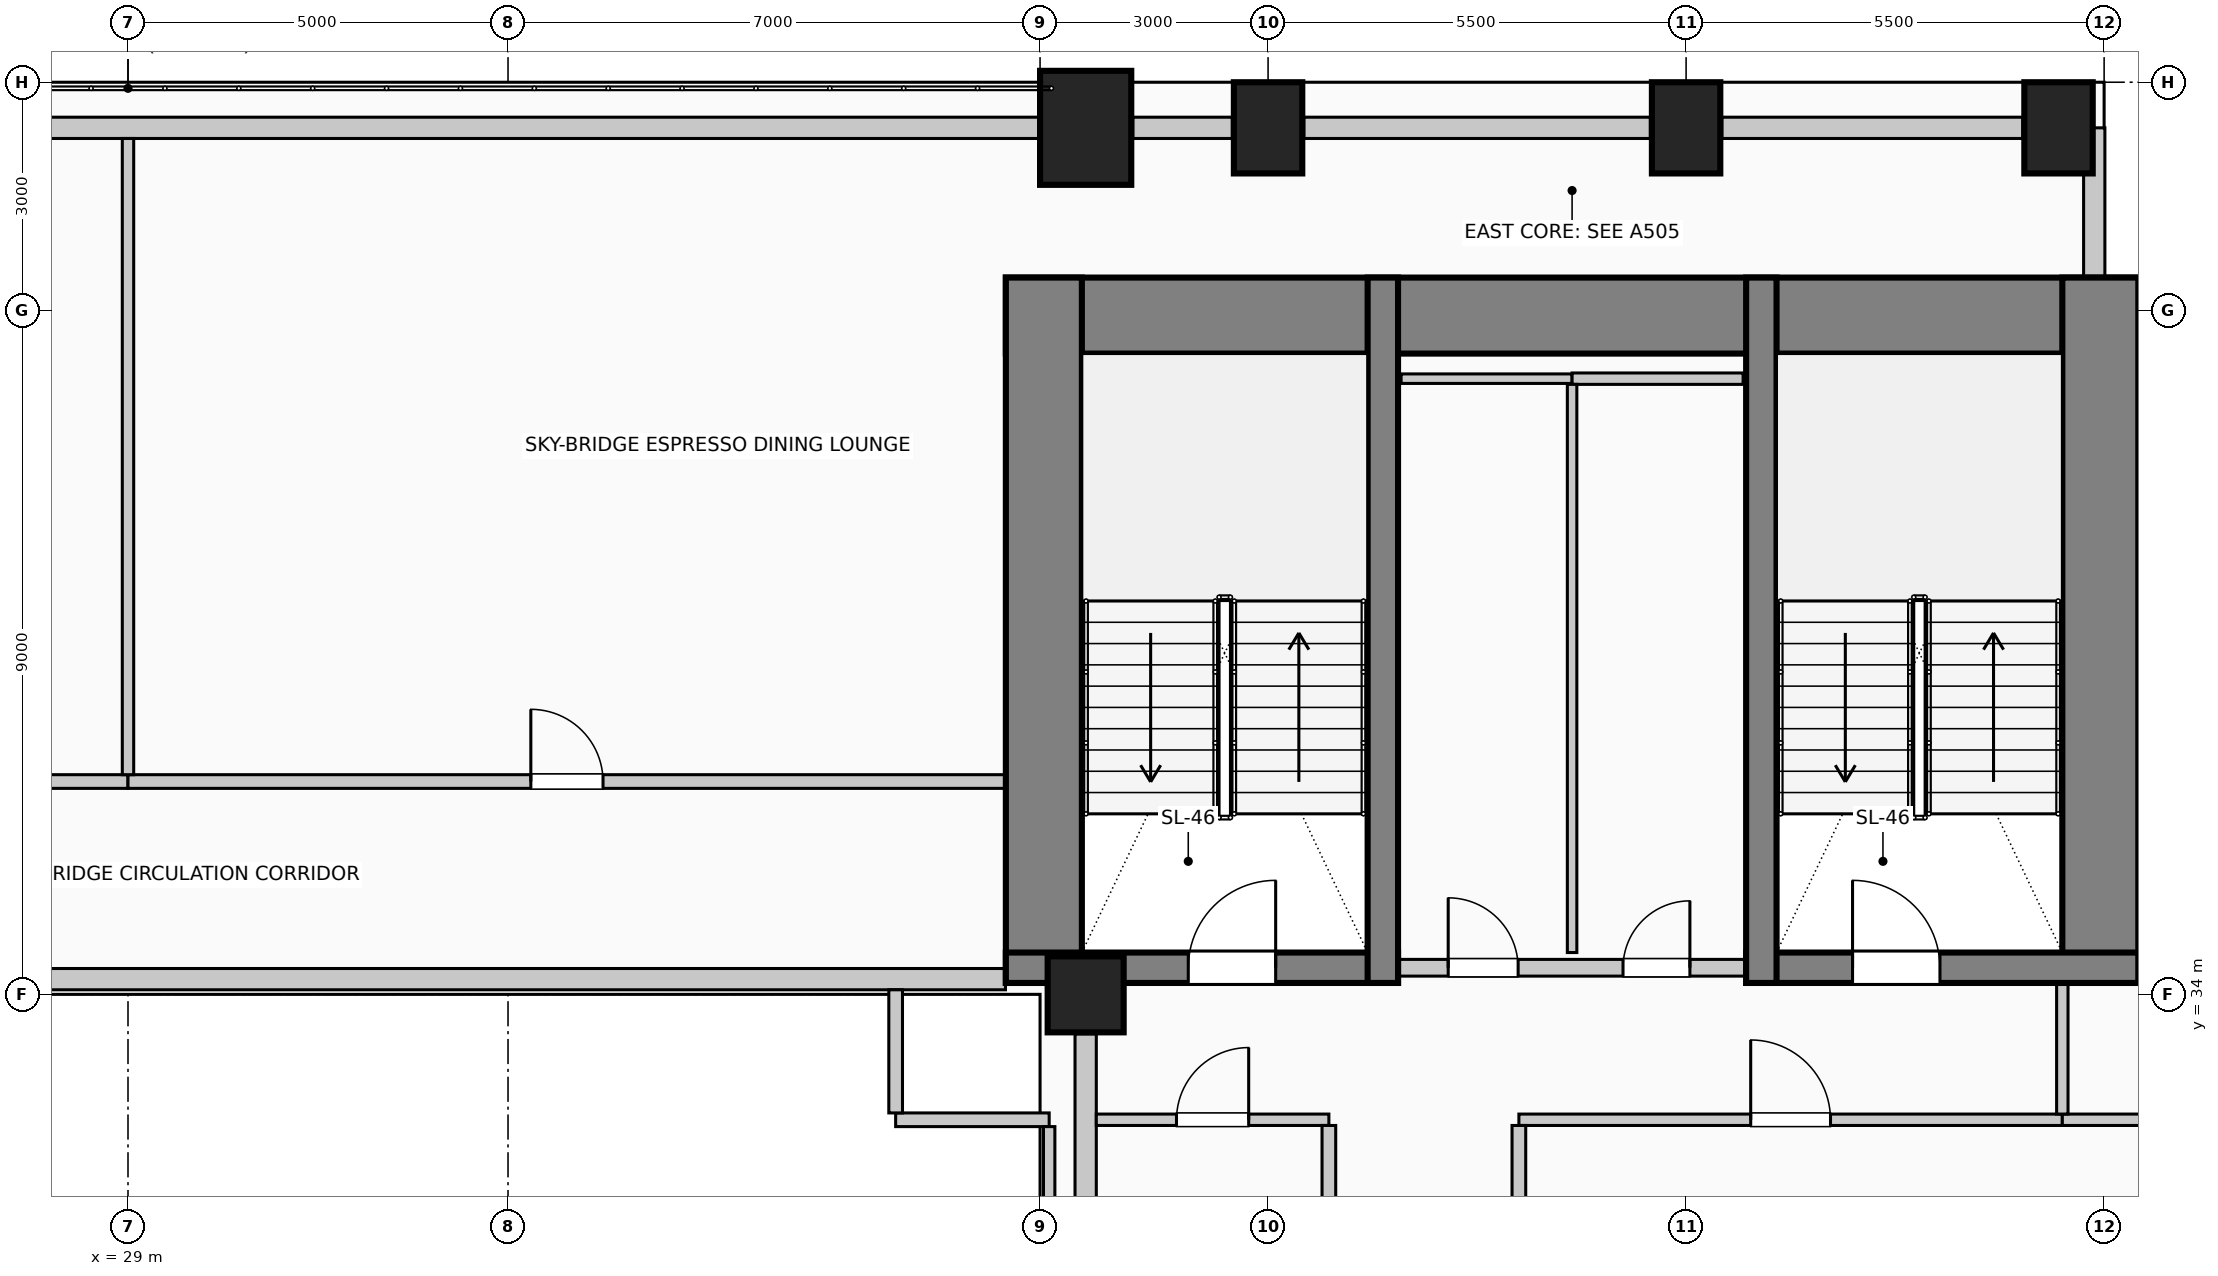
"""IFC4 building model, lengths in metres.
Left out: names, types, materials, properties, quantities, classifications, styles, units other than length and angle.
Written with IfcOpenShell. Run it as: python <this file> out.ifc"""

import sys

from ifc_helpers import new_model, si_unit, direction, frame, frame_2d, origin, origin_2d, place, context, subcontext, project, spatial, rectangle, circle, extrude, element, fill, save


model = new_model("IFC4")
c1 = context("Model", 3, precision=1e-05, world=origin(), true_north=direction((0.0, 1.0)))
c2 = subcontext(c1, "Body", "Model", "MODEL_VIEW")
j1 = project(units=[si_unit("LENGTHUNIT", "METRE"), si_unit("PLANEANGLEUNIT", "RADIAN")], contexts=[c1])
p1 = place(None, origin())
s1 = spatial("IfcSite", under=j1, at=p1, CompositionType="ELEMENT")
p2 = place(p1, origin())
s2 = spatial("IfcBuilding", under=s1, at=p2, CompositionType="ELEMENT")
p3 = place(p2, frame((0.0, 0.0, 42.6)))
s3 = spatial("IfcBuildingStorey", under=s2, at=p3, CompositionType="ELEMENT", Elevation=42.6)
p4 = place(p3, frame((40.55, 42.93, 0.0), z_axis=(0.0, 0.0, 1.0), x_axis=(1.0, 0.0, 0.0)))
e1 = element("IfcWall", 1, at=p4, inside=s3, PredefinedType="SHEAR", context=c2, shape_type="SweptSolid", body=[
    extrude(rectangle(XDim=14.9, YDim=1.0, at=frame_2d((7.45, 0.0))), origin(), (0.0, 0.0, 1.0), 4.0),
])
for number, where, z_axis, x_axis in (
    (2, (41.05, 34.15, 0.0), (0.0, 0.0, 1.0), (0.0, 1.0, 0.0)),
    (3, (54.95, 34.15, 0.0), (0.0, 0.0, 1.0), (0.0, 1.0, 0.0)),
):
    element("IfcWall", number, at=place(p3, frame(where, z_axis=z_axis, x_axis=x_axis)), inside=s3, PredefinedType="SHEAR", context=c2, shape_type="SweptSolid", body=[
        extrude(rectangle(XDim=9.28, YDim=1.0, at=frame_2d((4.64, 0.0))), origin(), (0.0, 0.0, 1.0), 4.0),
    ])
p5 = place(p3, frame((40.55, 34.35, 0.0), z_axis=(0.0, 0.0, 1.0), x_axis=(1.0, 0.0, 0.0)))
e4 = element("IfcWall", 4, at=p5, inside=s3, PredefinedType="SHEAR", context=c2, shape_type="SweptSolid", body=[
    extrude(rectangle(XDim=5.16, YDim=0.4, at=frame_2d((2.58, 0.0))), origin(), (0.0, 0.0, 1.0), 4.0),
])
p6 = place(p5, frame((2.4, 0.0, 0.0)))
e5 = element("IfcOpeningElement", 5, at=p6, cuts=e4, PredefinedType="OPENING", context=c2, shape_type="SweptSolid", body=[
    extrude(rectangle(XDim=1.15, YDim=2.2, at=frame_2d((0.575, 1.1))), frame((0.0, 0.21, 0.0), z_axis=(0.0, -1.0, 0.0), x_axis=(1.0, 0.0, 0.0)), (0.0, 0.0, 1.0), 0.42),
])
p7 = place(p3, frame((45.51, 34.15, 0.0), z_axis=(0.0, 0.0, 1.0), x_axis=(0.0, 1.0, 0.0)))
e6 = element("IfcWall", 6, at=p7, inside=s3, PredefinedType="SHEAR", context=c2, shape_type="SweptSolid", body=[
    extrude(rectangle(XDim=9.28, YDim=0.4, at=frame_2d((4.64, 0.0))), origin(), (0.0, 0.0, 1.0), 4.0),
])
p8 = place(p3, frame((50.29, 34.35, 0.0), z_axis=(0.0, 0.0, 1.0), x_axis=(1.0, 0.0, 0.0)))
e7 = element("IfcWall", 7, at=p8, inside=s3, PredefinedType="SHEAR", context=c2, shape_type="SweptSolid", body=[
    extrude(rectangle(XDim=5.16, YDim=0.4, at=frame_2d((2.58, 0.0))), origin(), (0.0, 0.0, 1.0), 4.0),
])
p9 = place(p8, frame((1.4, 0.0, 0.0)))
e8 = element("IfcOpeningElement", 8, at=p9, cuts=e7, PredefinedType="OPENING", context=c2, shape_type="SweptSolid", body=[
    extrude(rectangle(XDim=1.15, YDim=2.2, at=frame_2d((0.575, 1.1))), frame((0.0, 0.21, 0.0), z_axis=(0.0, -1.0, 0.0), x_axis=(1.0, 0.0, 0.0)), (0.0, 0.0, 1.0), 0.42),
])
p10 = place(p3, frame((50.49, 34.15, 0.0), z_axis=(0.0, 0.0, 1.0), x_axis=(0.0, 1.0, 0.0)))
e9 = element("IfcWall", 9, at=p10, inside=s3, PredefinedType="SHEAR", context=c2, shape_type="SweptSolid", body=[
    extrude(rectangle(XDim=9.28, YDim=0.4, at=frame_2d((4.64, 0.0))), origin(), (0.0, 0.0, 1.0), 4.0),
])
p11 = place(p3, frame((41.6, 45.4, 0.0), z_axis=(0.0, 0.0, 1.0), x_axis=(1.0, 0.0, 0.0)))
e10 = element("IfcColumn", 10, at=p11, inside=s3, PredefinedType="COLUMN", context=c2, shape_type="SweptSolid", body=[
    extrude(rectangle(XDim=1.2, YDim=1.5, at=origin_2d()), origin(), (0.0, 0.0, 1.0), 4.0),
])
for number, where, z_axis, x_axis in (
    (11, (44.0, 45.4, 0.0), (0.0, 0.0, 1.0), (1.0, 0.0, 0.0)),
    (12, (49.5, 45.4, 0.0), (0.0, 0.0, 1.0), (1.0, 0.0, 0.0)),
    (13, (54.4, 45.4, 0.0), (0.0, 0.0, 1.0), (1.0, 0.0, 0.0)),
):
    element("IfcColumn", number, at=place(p3, frame(where, z_axis=z_axis, x_axis=x_axis)), inside=s3, PredefinedType="COLUMN", context=c2, shape_type="SweptSolid", body=[
        extrude(rectangle(XDim=0.9, YDim=1.2, at=origin_2d()), origin(), (0.0, 0.0, 1.0), 4.0),
    ])
p12 = place(p3, frame((41.6, 34.0, 0.0), z_axis=(0.0, 0.0, 1.0), x_axis=(1.0, 0.0, 0.0)))
e14 = element("IfcColumn", 14, at=p12, inside=s3, PredefinedType="COLUMN", context=c2, shape_type="SweptSolid", body=[
    extrude(circle(Radius=0.5, at=origin_2d()), origin(), (0.0, 0.0, 1.0), 4.0),
])
p13 = place(p3, frame((17.02, 45.4, 0.0), z_axis=(0.0, 0.0, 1.0), x_axis=(1.0, 0.0, 0.0)))
e15 = element("IfcWall", 15, at=p13, inside=s3, PredefinedType="SOLIDWALL", context=c2, shape_type="SweptSolid", body=[
    extrude(rectangle(XDim=23.96, YDim=0.28, at=frame_2d((11.98, 0.0))), origin(), (0.0, 0.0, 1.0), 0.7),
])
p14 = place(p3, frame((42.22, 45.4, 0.0), z_axis=(0.0, 0.0, 1.0), x_axis=(1.0, 0.0, 0.0)))
e16 = element("IfcWall", 16, at=p14, inside=s3, PredefinedType="SOLIDWALL", context=c2, shape_type="SweptSolid", body=[
    extrude(rectangle(XDim=1.31, YDim=0.28, at=frame_2d((0.655, 0.0))), origin(), (0.0, 0.0, 1.0), 2.85),
])
p15 = place(p3, frame((44.47, 45.4, 0.0), z_axis=(0.0, 0.0, 1.0), x_axis=(1.0, 0.0, 0.0)))
e17 = element("IfcWall", 17, at=p15, inside=s3, PredefinedType="SOLIDWALL", context=c2, shape_type="SweptSolid", body=[
    extrude(rectangle(XDim=4.56, YDim=0.28, at=frame_2d((2.28, 0.0))), origin(), (0.0, 0.0, 1.0), 2.85),
])
p16 = place(p3, frame((49.97, 45.4, 0.0), z_axis=(0.0, 0.0, 1.0), x_axis=(1.0, 0.0, 0.0)))
e18 = element("IfcWall", 18, at=p16, inside=s3, PredefinedType="SOLIDWALL", context=c2, shape_type="SweptSolid", body=[
    extrude(rectangle(XDim=3.96, YDim=0.28, at=frame_2d((1.98, 0.0))), origin(), (0.0, 0.0, 1.0), 2.85),
])
p17 = place(p3, frame((54.87, 45.4, 0.0), z_axis=(0.0, 0.0, 1.0), x_axis=(0.0, -1.0, 0.0)))
e19 = element("IfcWall", 19, at=p17, inside=s3, PredefinedType="SOLIDWALL", context=c2, shape_type="SweptSolid", body=[
    extrude(rectangle(XDim=1.965, YDim=0.28, at=frame_2d((0.982, 0.0))), origin(), (0.0, 0.0, 1.0), 3.7),
])
p18 = place(p3, frame((41.6, 26.77, 0.0), z_axis=(0.0, 0.0, 1.0), x_axis=(0.0, 1.0, 0.0)))
e20 = element("IfcWall", 20, at=p18, inside=s3, PredefinedType="SOLIDWALL", context=c2, shape_type="SweptSolid", body=[
    extrude(rectangle(XDim=6.71, YDim=0.28, at=frame_2d((3.355, 0.0))), origin(), (0.0, 0.0, 1.0), 3.0),
])
p19 = place(p3, frame((40.545, 34.2, 0.0), z_axis=(0.0, 0.0, 1.0), x_axis=(-1.0, 0.0, 0.0)))
e21 = element("IfcWall", 21, at=p19, inside=s3, PredefinedType="SOLIDWALL", context=c2, shape_type="SweptSolid", body=[
    extrude(rectangle(XDim=23.09, YDim=0.28, at=frame_2d((11.545, 0.0))), origin(), (0.0, 0.0, 1.0), 0.7),
])
p20 = place(p3, frame((45.72, 34.35, 0.0), z_axis=(0.0, 0.0, 1.0), x_axis=(1.0, 0.0, 0.0)))
e22 = element("IfcWall", 22, at=p20, inside=s3, PredefinedType="PARTITIONING", context=c2, shape_type="SweptSolid", body=[
    extrude(rectangle(XDim=4.56, YDim=0.22, at=frame_2d((2.28, 0.0))), origin(), (0.0, 0.0, 1.0), 3.7),
])
p21 = place(p20, frame((0.65, 0.0, 0.0)))
e23 = element("IfcOpeningElement", 23, at=p21, cuts=e22, PredefinedType="OPENING", context=c2, shape_type="SweptSolid", body=[
    extrude(rectangle(XDim=0.92, YDim=2.1, at=frame_2d((0.46, 1.05))), frame((0.0, 0.12, 0.0), z_axis=(0.0, -1.0, 0.0), x_axis=(1.0, 0.0, 0.0)), (0.0, 0.0, 1.0), 0.24),
])
p22 = place(p20, frame((2.95, 0.0, 0.0)))
e24 = element("IfcOpeningElement", 24, at=p22, cuts=e22, PredefinedType="OPENING", context=c2, shape_type="SweptSolid", body=[
    extrude(rectangle(XDim=0.88, YDim=2.1, at=frame_2d((0.44, 1.05))), frame((0.0, 0.12, 0.0), z_axis=(0.0, -1.0, 0.0), x_axis=(1.0, 0.0, 0.0)), (0.0, 0.0, 1.0), 0.24),
])
p23 = place(p3, frame((39.1, 32.35, 0.0), z_axis=(0.0, 0.0, 1.0), x_axis=(1.0, 0.0, 0.0)))
e25 = element("IfcWall", 25, at=p23, inside=s3, PredefinedType="PARTITIONING", context=c2, shape_type="SweptSolid", body=[
    extrude(rectangle(XDim=2.02, YDim=0.18, at=frame_2d((1.01, 0.0))), origin(), (0.0, 0.0, 1.0), 3.7),
])
p24 = place(p3, frame((41.74, 32.35, 0.0), z_axis=(0.0, 0.0, 1.0), x_axis=(1.0, 0.0, 0.0)))
e26 = element("IfcWall", 26, at=p24, inside=s3, PredefinedType="PARTITIONING", context=c2, shape_type="SweptSolid", body=[
    extrude(rectangle(XDim=3.06, YDim=0.15, at=frame_2d((1.53, 0.0))), origin(), (0.0, 0.0, 1.0), 3.7),
])
p25 = place(p24, frame((1.055, 0.0, 0.0)))
e27 = element("IfcOpeningElement", 27, at=p25, cuts=e26, PredefinedType="OPENING", context=c2, shape_type="SweptSolid", body=[
    extrude(rectangle(XDim=0.95, YDim=2.15, at=frame_2d((0.475, 1.075))), frame((0.0, 0.085, 0.0), z_axis=(0.0, -1.0, 0.0), x_axis=(1.0, 0.0, 0.0)), (0.0, 0.0, 1.0), 0.17),
])
p26 = place(p3, frame((47.3, 32.35, 0.0), z_axis=(0.0, 0.0, 1.0), x_axis=(1.0, 0.0, 0.0)))
e28 = element("IfcWall", 28, at=p26, inside=s3, PredefinedType="PARTITIONING", context=c2, shape_type="SweptSolid", body=[
    extrude(rectangle(XDim=7.15, YDim=0.15, at=frame_2d((3.575, 0.0))), origin(), (0.0, 0.0, 1.0), 3.7),
])
p27 = place(p26, frame((3.05, 0.0, 0.0)))
e29 = element("IfcOpeningElement", 29, at=p27, cuts=e28, PredefinedType="OPENING", context=c2, shape_type="SweptSolid", body=[
    extrude(rectangle(XDim=1.05, YDim=2.15, at=frame_2d((0.525, 1.075))), frame((0.0, 0.085, 0.0), z_axis=(0.0, -1.0, 0.0), x_axis=(1.0, 0.0, 0.0)), (0.0, 0.0, 1.0), 0.17),
])
p28 = place(p3, frame((54.45, 32.35, 0.0), z_axis=(0.0, 0.0, 1.0), x_axis=(1.0, 0.0, 0.0)))
e30 = element("IfcWall", 30, at=p28, inside=s3, PredefinedType="PARTITIONING", context=c2, shape_type="SweptSolid", body=[
    extrude(rectangle(XDim=2.81, YDim=0.15, at=frame_2d((1.405, 0.0))), origin(), (0.0, 0.0, 1.0), 3.7),
])
p29 = place(p3, frame((17.45, 36.8, 0.0), z_axis=(0.0, 0.0, 1.0), x_axis=(1.0, 0.0, 0.0)))
e31 = element("IfcWall", 31, at=p29, inside=s3, PredefinedType="PARTITIONING", context=c2, shape_type="SweptSolid", body=[
    extrude(rectangle(XDim=11.55, YDim=0.18, at=frame_2d((5.775, 0.0))), origin(), (0.0, 0.0, 1.0), 3.7),
])
p30 = place(p29, frame((5.075, 0.0, 0.0)))
e32 = element("IfcOpeningElement", 32, at=p30, cuts=e31, PredefinedType="OPENING", context=c2, shape_type="SweptSolid", body=[
    extrude(rectangle(XDim=1.4, YDim=2.2, at=frame_2d((0.7, 1.1))), frame((0.0, 0.1, 0.0), z_axis=(0.0, -1.0, 0.0), x_axis=(1.0, 0.0, 0.0)), (0.0, 0.0, 1.0), 0.2),
])
p31 = place(p3, frame((29.0, 36.8, 0.0), z_axis=(0.0, 0.0, 1.0), x_axis=(1.0, 0.0, 0.0)))
e33 = element("IfcWall", 33, at=p31, inside=s3, PredefinedType="PARTITIONING", context=c2, shape_type="SweptSolid", body=[
    extrude(rectangle(XDim=11.55, YDim=0.18, at=frame_2d((5.775, 0.0))), origin(), (0.0, 0.0, 1.0), 3.7),
])
p32 = place(p31, frame((5.3, 0.0, 0.0)))
e34 = element("IfcOpeningElement", 34, at=p32, cuts=e33, PredefinedType="OPENING", context=c2, shape_type="SweptSolid", body=[
    extrude(rectangle(XDim=0.95, YDim=2.15, at=frame_2d((0.475, 1.075))), frame((0.0, 0.1, 0.0), z_axis=(0.0, -1.0, 0.0), x_axis=(1.0, 0.0, 0.0)), (0.0, 0.0, 1.0), 0.2),
])
p33 = place(p3, frame((45.75, 42.1, 0.0), z_axis=(0.0, 0.0, 1.0), x_axis=(1.0, 0.0, 0.0)))
e35 = element("IfcWall", 35, at=p33, inside=s3, PredefinedType="PARTITIONING", context=c2, shape_type="SweptSolid", body=[
    extrude(rectangle(XDim=2.25, YDim=0.125, at=frame_2d((1.125, 0.0))), origin(), (0.0, 0.0, 1.0), 3.7),
])
p34 = place(p3, frame((48.0, 42.1, 0.0), z_axis=(0.0, 0.0, 1.0), x_axis=(1.0, 0.0, 0.0)))
e36 = element("IfcWall", 36, at=p34, inside=s3, PredefinedType="PARTITIONING", context=c2, shape_type="SweptSolid", body=[
    extrude(rectangle(XDim=2.25, YDim=0.15, at=frame_2d((1.125, 0.0))), origin(), (0.0, 0.0, 1.0), 3.7),
])
p35 = place(p3, frame((29.0, 36.89, 0.0), z_axis=(0.0, 0.0, 1.0), x_axis=(0.0, 1.0, 0.0)))
e37 = element("IfcWall", 37, at=p35, inside=s3, PredefinedType="PARTITIONING", context=c2, shape_type="SweptSolid", body=[
    extrude(rectangle(XDim=8.37, YDim=0.15, at=frame_2d((4.185, 0.0))), origin(), (0.0, 0.0, 1.0), 3.7),
])
p36 = place(p3, frame((39.1, 32.44, 0.0), z_axis=(0.0, 0.0, 1.0), x_axis=(0.0, 1.0, 0.0)))
e38 = element("IfcWall", 38, at=p36, inside=s3, PredefinedType="PARTITIONING", context=c2, shape_type="SweptSolid", body=[
    extrude(rectangle(XDim=1.62, YDim=0.18, at=frame_2d((0.81, 0.0))), origin(), (0.0, 0.0, 1.0), 3.7),
])
p37 = place(p3, frame((41.12, 26.75, 0.0), z_axis=(0.0, 0.0, 1.0), x_axis=(0.0, 1.0, 0.0)))
e39 = element("IfcWall", 39, at=p37, inside=s3, PredefinedType="PARTITIONING", context=c2, shape_type="SweptSolid", body=[
    extrude(rectangle(XDim=5.51, YDim=0.15, at=frame_2d((2.755, 0.0))), origin(), (0.0, 0.0, 1.0), 3.7),
])
p38 = place(p3, frame((44.8, 9.09, 0.0), z_axis=(0.0, 0.0, 1.0), x_axis=(0.0, 1.0, 0.0)))
e40 = element("IfcWall", 40, at=p38, inside=s3, PredefinedType="PARTITIONING", context=c2, shape_type="SweptSolid", body=[
    extrude(rectangle(XDim=23.185, YDim=0.18, at=frame_2d((11.592, 0.0))), origin(), (0.0, 0.0, 1.0), 3.7),
])
p39 = place(p3, frame((47.3, 18.075, 0.0), z_axis=(0.0, 0.0, 1.0), x_axis=(0.0, 1.0, 0.0)))
e41 = element("IfcWall", 41, at=p39, inside=s3, PredefinedType="PARTITIONING", context=c2, shape_type="SweptSolid", body=[
    extrude(rectangle(XDim=14.2, YDim=0.18, at=frame_2d((7.1, 0.0))), origin(), (0.0, 0.0, 1.0), 3.7),
])
p40 = place(p3, frame((48.0, 34.55, 0.0), z_axis=(0.0, 0.0, 1.0), x_axis=(0.0, 1.0, 0.0)))
e42 = element("IfcWall", 42, at=p40, inside=s3, PredefinedType="PARTITIONING", context=c2, shape_type="SweptSolid", body=[
    extrude(rectangle(XDim=7.475, YDim=0.125, at=frame_2d((3.737, 0.0))), origin(), (0.0, 0.0, 1.0), 3.7),
])
p41 = place(p3, frame((54.45, 32.425, 0.0), z_axis=(0.0, 0.0, 1.0), x_axis=(0.0, 1.0, 0.0)))
e43 = element("IfcWall", 43, at=p41, inside=s3, PredefinedType="PARTITIONING", context=c2, shape_type="SweptSolid", body=[
    extrude(rectangle(XDim=1.725, YDim=0.15, at=frame_2d((0.862, 0.0))), origin(), (0.0, 0.0, 1.0), 3.7),
])
p42 = place(p6, origin())
e44 = element("IfcDoor", 44, at=p42, inside=s3, OperationType="SINGLE_SWING_RIGHT", PredefinedType="DOOR", context=c2, shape_type="SweptSolid", body=[
    extrude(rectangle(XDim=1.15, YDim=2.2, at=frame_2d((0.575, 1.1))), frame((0.0, 0.025, 0.0), z_axis=(0.0, -1.0, 0.0), x_axis=(1.0, 0.0, 0.0)), (0.0, 0.0, 1.0), 0.05),
])
fill(e5, e44)
p43 = place(p21, origin())
e45 = element("IfcDoor", 45, at=p43, inside=s3, OperationType="SINGLE_SWING_LEFT", PredefinedType="DOOR", context=c2, shape_type="SweptSolid", body=[
    extrude(rectangle(XDim=0.92, YDim=2.1, at=frame_2d((0.46, 1.05))), frame((0.0, 0.025, 0.0), z_axis=(0.0, -1.0, 0.0), x_axis=(1.0, 0.0, 0.0)), (0.0, 0.0, 1.0), 0.05),
])
fill(e23, e45)
p44 = place(p22, origin())
e46 = element("IfcDoor", 46, at=p44, inside=s3, OperationType="SINGLE_SWING_RIGHT", PredefinedType="DOOR", context=c2, shape_type="SweptSolid", body=[
    extrude(rectangle(XDim=0.88, YDim=2.1, at=frame_2d((0.44, 1.05))), frame((0.0, 0.025, 0.0), z_axis=(0.0, -1.0, 0.0), x_axis=(1.0, 0.0, 0.0)), (0.0, 0.0, 1.0), 0.05),
])
fill(e24, e46)
p45 = place(p9, origin())
e47 = element("IfcDoor", 47, at=p45, inside=s3, OperationType="SINGLE_SWING_LEFT", PredefinedType="DOOR", context=c2, shape_type="SweptSolid", body=[
    extrude(rectangle(XDim=1.15, YDim=2.2, at=frame_2d((0.575, 1.1))), frame((0.0, 0.025, 0.0), z_axis=(0.0, -1.0, 0.0), x_axis=(1.0, 0.0, 0.0)), (0.0, 0.0, 1.0), 0.05),
])
fill(e8, e47)
p46 = place(p25, origin())
e48 = element("IfcDoor", 48, at=p46, inside=s3, OperationType="SINGLE_SWING_RIGHT", PredefinedType="DOOR", context=c2, shape_type="SweptSolid", body=[
    extrude(rectangle(XDim=0.95, YDim=2.15, at=frame_2d((0.475, 1.075))), frame((0.0, 0.025, 0.0), z_axis=(0.0, -1.0, 0.0), x_axis=(1.0, 0.0, 0.0)), (0.0, 0.0, 1.0), 0.05),
])
fill(e27, e48)
p47 = place(p27, origin())
e49 = element("IfcDoor", 49, at=p47, inside=s3, OperationType="SINGLE_SWING_LEFT", PredefinedType="DOOR", context=c2, shape_type="SweptSolid", body=[
    extrude(rectangle(XDim=1.05, YDim=2.15, at=frame_2d((0.525, 1.075))), frame((0.0, 0.025, 0.0), z_axis=(0.0, -1.0, 0.0), x_axis=(1.0, 0.0, 0.0)), (0.0, 0.0, 1.0), 0.05),
])
fill(e29, e49)
p48 = place(p32, origin())
e50 = element("IfcDoor", 50, at=p48, inside=s3, OperationType="SINGLE_SWING_LEFT", PredefinedType="DOOR", context=c2, shape_type="SweptSolid", body=[
    extrude(rectangle(XDim=0.95, YDim=2.15, at=frame_2d((0.475, 1.075))), frame((0.0, 0.025, 0.0), z_axis=(0.0, -1.0, 0.0), x_axis=(1.0, 0.0, 0.0)), (0.0, 0.0, 1.0), 0.05),
])
fill(e34, e50)
save(model, sys.argv[1])
